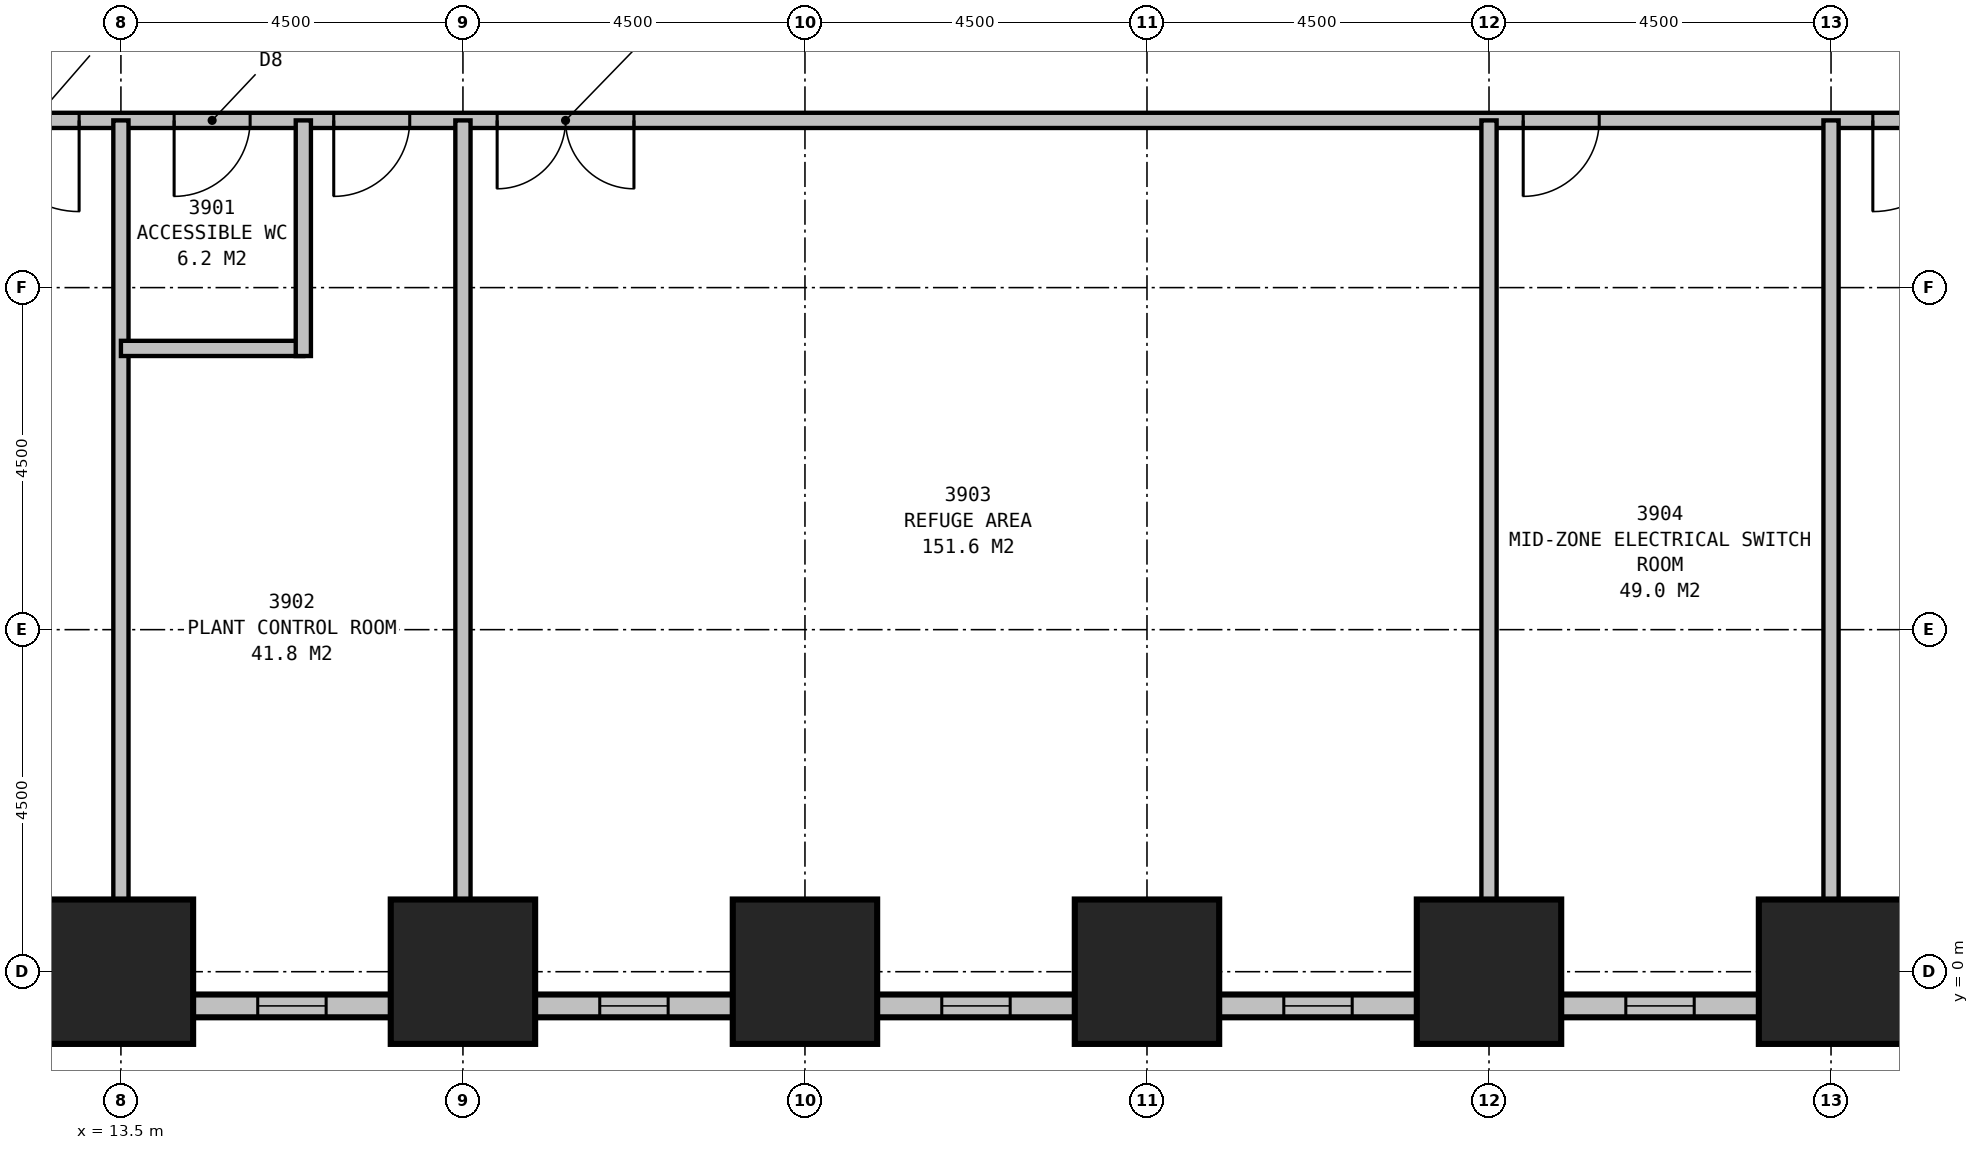
"""IFC4 building model, lengths in metres.
Left out: names, types, materials, properties, quantities, classifications, styles, units other than length and angle.
Written with IfcOpenShell. Run it as: python <this file> out.ifc"""

import sys

from ifc_helpers import new_model, si_unit, direction, frame, frame_2d, origin, origin_2d, place, context, subcontext, project, spatial, rectangle, extrude, element, fill, save


model = new_model("IFC4")
c1 = context("Model", 3, precision=1e-05, world=origin(), true_north=direction((0.0, 1.0)))
c2 = subcontext(c1, "Body", "Model", "MODEL_VIEW")
j1 = project(units=[si_unit("LENGTHUNIT", "METRE"), si_unit("PLANEANGLEUNIT", "RADIAN")], contexts=[c1])
p1 = place(None, origin())
s1 = spatial("IfcSite", under=j1, at=p1, CompositionType="ELEMENT")
p2 = place(p1, origin())
s2 = spatial("IfcBuilding", under=s1, at=p2, CompositionType="ELEMENT")
p3 = place(p2, frame((0.0, 0.0, 151.9)))
s3 = spatial("IfcBuildingStorey", under=s2, at=p3, CompositionType="ELEMENT", Elevation=151.9)
for number, where, z_axis, x_axis in (
    (1, (13.5, 0.0, 0.0), (0.0, 0.0, 1.0), (1.0, 0.0, 0.0)),
    (2, (18.0, 0.0, 0.0), (0.0, 0.0, 1.0), (1.0, 0.0, 0.0)),
    (3, (22.5, 0.0, 0.0), (0.0, 0.0, 1.0), (1.0, 0.0, 0.0)),
    (4, (27.0, 0.0, 0.0), (0.0, 0.0, 1.0), (1.0, 0.0, 0.0)),
    (5, (31.5, 0.0, 0.0), (0.0, 0.0, 1.0), (1.0, 0.0, 0.0)),
    (6, (36.0, 0.0, 0.0), (0.0, 0.0, 1.0), (1.0, 0.0, 0.0)),
):
    element("IfcColumn", number, at=place(p3, frame(where, z_axis=z_axis, x_axis=x_axis)), inside=s3, PredefinedType="COLUMN", context=c2, shape_type="SweptSolid", body=[
        extrude(rectangle(XDim=1.9, YDim=1.9, at=origin_2d()), origin(), (0.0, 0.0, 1.0), 6.0),
    ])
p4 = place(p3, frame((3.9, -0.45, 0.0), z_axis=(0.0, 0.0, 1.0), x_axis=(1.0, 0.0, 0.0)))
e7 = element("IfcWall", 7, at=p4, inside=s3, PredefinedType="STANDARD", context=c2, shape_type="SweptSolid", body=[
    extrude(rectangle(XDim=41.7, YDim=0.3, at=frame_2d((20.85, 0.0))), origin(), (0.0, 0.0, 1.0), 3.35),
])
p5 = place(p4, frame((2.4, 0.0, 0.5)))
e8 = element("IfcOpeningElement", 8, at=p5, cuts=e7, PredefinedType="OPENING", context=c2, shape_type="SweptSolid", body=[
    extrude(rectangle(XDim=0.9, YDim=1.2, at=frame_2d((0.45, 0.6))), frame((0.0, 0.16, 0.0), z_axis=(0.0, -1.0, 0.0), x_axis=(1.0, 0.0, 0.0)), (0.0, 0.0, 1.0), 0.32),
])
p6 = place(p4, frame((6.9, 0.0, 0.5)))
e9 = element("IfcOpeningElement", 9, at=p6, cuts=e7, PredefinedType="OPENING", context=c2, shape_type="SweptSolid", body=[
    extrude(rectangle(XDim=0.9, YDim=1.2, at=frame_2d((0.45, 0.6))), frame((0.0, 0.16, 0.0), z_axis=(0.0, -1.0, 0.0), x_axis=(1.0, 0.0, 0.0)), (0.0, 0.0, 1.0), 0.32),
])
p7 = place(p4, frame((11.4, 0.0, 0.5)))
e10 = element("IfcOpeningElement", 10, at=p7, cuts=e7, PredefinedType="OPENING", context=c2, shape_type="SweptSolid", body=[
    extrude(rectangle(XDim=0.9, YDim=1.2, at=frame_2d((0.45, 0.6))), frame((0.0, 0.16, 0.0), z_axis=(0.0, -1.0, 0.0), x_axis=(1.0, 0.0, 0.0)), (0.0, 0.0, 1.0), 0.32),
])
p8 = place(p4, frame((15.9, 0.0, 0.5)))
e11 = element("IfcOpeningElement", 11, at=p8, cuts=e7, PredefinedType="OPENING", context=c2, shape_type="SweptSolid", body=[
    extrude(rectangle(XDim=0.9, YDim=1.2, at=frame_2d((0.45, 0.6))), frame((0.0, 0.16, 0.0), z_axis=(0.0, -1.0, 0.0), x_axis=(1.0, 0.0, 0.0)), (0.0, 0.0, 1.0), 0.32),
])
p9 = place(p4, frame((20.4, 0.0, 0.5)))
e12 = element("IfcOpeningElement", 12, at=p9, cuts=e7, PredefinedType="OPENING", context=c2, shape_type="SweptSolid", body=[
    extrude(rectangle(XDim=0.9, YDim=1.2, at=frame_2d((0.45, 0.6))), frame((0.0, 0.16, 0.0), z_axis=(0.0, -1.0, 0.0), x_axis=(1.0, 0.0, 0.0)), (0.0, 0.0, 1.0), 0.32),
])
p10 = place(p4, frame((24.9, 0.0, 0.5)))
e13 = element("IfcOpeningElement", 13, at=p10, cuts=e7, PredefinedType="OPENING", context=c2, shape_type="SweptSolid", body=[
    extrude(rectangle(XDim=0.9, YDim=1.2, at=frame_2d((0.45, 0.6))), frame((0.0, 0.16, 0.0), z_axis=(0.0, -1.0, 0.0), x_axis=(1.0, 0.0, 0.0)), (0.0, 0.0, 1.0), 0.32),
])
p11 = place(p4, frame((29.4, 0.0, 0.5)))
e14 = element("IfcOpeningElement", 14, at=p11, cuts=e7, PredefinedType="OPENING", context=c2, shape_type="SweptSolid", body=[
    extrude(rectangle(XDim=0.9, YDim=1.2, at=frame_2d((0.45, 0.6))), frame((0.0, 0.16, 0.0), z_axis=(0.0, -1.0, 0.0), x_axis=(1.0, 0.0, 0.0)), (0.0, 0.0, 1.0), 0.32),
])
p12 = place(p4, frame((33.9, 0.0, 0.5)))
e15 = element("IfcOpeningElement", 15, at=p12, cuts=e7, PredefinedType="OPENING", context=c2, shape_type="SweptSolid", body=[
    extrude(rectangle(XDim=0.9, YDim=1.2, at=frame_2d((0.45, 0.6))), frame((0.0, 0.16, 0.0), z_axis=(0.0, -1.0, 0.0), x_axis=(1.0, 0.0, 0.0)), (0.0, 0.0, 1.0), 0.32),
])
p13 = place(p4, frame((38.4, 0.0, 0.5)))
e16 = element("IfcOpeningElement", 16, at=p13, cuts=e7, PredefinedType="OPENING", context=c2, shape_type="SweptSolid", body=[
    extrude(rectangle(XDim=0.9, YDim=1.2, at=frame_2d((0.45, 0.6))), frame((0.0, 0.16, 0.0), z_axis=(0.0, -1.0, 0.0), x_axis=(1.0, 0.0, 0.0)), (0.0, 0.0, 1.0), 0.32),
])
p14 = place(p3, frame((11.2, 11.2, 0.0), z_axis=(0.0, 0.0, 1.0), x_axis=(1.0, 0.0, 0.0)))
e17 = element("IfcWall", 17, at=p14, inside=s3, PredefinedType="PARTITIONING", context=c2, shape_type="SweptSolid", body=[
    extrude(rectangle(XDim=27.1, YDim=0.2, at=frame_2d((13.55, 0.0))), origin(), (0.0, 0.0, 1.0), 5.75),
])
p15 = place(p14, frame((4.0, 0.0, 0.0), z_axis=(0.0, 0.0, 1.0), x_axis=(-1.0, 0.0, 0.0)))
e18 = element("IfcOpeningElement", 18, at=p15, cuts=e17, PredefinedType="OPENING", context=c2, shape_type="SweptSolid", body=[
    extrude(rectangle(XDim=1.0, YDim=2.1, at=frame_2d((0.5, 1.05))), frame((0.0, 0.11, 0.0), z_axis=(0.0, -1.0, 0.0), x_axis=(1.0, 0.0, 0.0)), (0.0, 0.0, 1.0), 0.22),
])
p16 = place(p14, frame((6.1, 0.0, 0.0), z_axis=(0.0, 0.0, 1.0), x_axis=(-1.0, 0.0, 0.0)))
e19 = element("IfcOpeningElement", 19, at=p16, cuts=e17, PredefinedType="OPENING", context=c2, shape_type="SweptSolid", body=[
    extrude(rectangle(XDim=1.0, YDim=2.1, at=frame_2d((0.5, 1.05))), frame((0.0, 0.11, 0.0), z_axis=(0.0, -1.0, 0.0), x_axis=(1.0, 0.0, 0.0)), (0.0, 0.0, 1.0), 0.22),
])
p17 = place(p14, frame((9.05, 0.0, 0.0), z_axis=(0.0, 0.0, 1.0), x_axis=(-1.0, 0.0, 0.0)))
e20 = element("IfcOpeningElement", 20, at=p17, cuts=e17, PredefinedType="OPENING", context=c2, shape_type="SweptSolid", body=[
    extrude(rectangle(XDim=1.8, YDim=2.4, at=frame_2d((0.9, 1.2))), frame((0.0, 0.11, 0.0), z_axis=(0.0, -1.0, 0.0), x_axis=(1.0, 0.0, 0.0)), (0.0, 0.0, 1.0), 0.22),
])
p18 = place(p14, frame((21.75, 0.0, 0.0), z_axis=(0.0, 0.0, 1.0), x_axis=(-1.0, 0.0, 0.0)))
e21 = element("IfcOpeningElement", 21, at=p18, cuts=e17, PredefinedType="OPENING", context=c2, shape_type="SweptSolid", body=[
    extrude(rectangle(XDim=1.0, YDim=2.1, at=frame_2d((0.5, 1.05))), frame((0.0, 0.11, 0.0), z_axis=(0.0, -1.0, 0.0), x_axis=(1.0, 0.0, 0.0)), (0.0, 0.0, 1.0), 0.22),
])
p19 = place(p14, frame((1.75, 0.0, 0.0), z_axis=(0.0, 0.0, 1.0), x_axis=(-1.0, 0.0, 0.0)))
e22 = element("IfcOpeningElement", 22, at=p19, cuts=e17, PredefinedType="OPENING", context=c2, shape_type="SweptSolid", body=[
    extrude(rectangle(XDim=1.2, YDim=2.1, at=frame_2d((0.6, 1.05))), frame((0.0, 0.11, 0.0), z_axis=(0.0, -1.0, 0.0), x_axis=(1.0, 0.0, 0.0)), (0.0, 0.0, 1.0), 0.22),
])
p20 = place(p14, frame((26.55, 0.0, 0.0), z_axis=(0.0, 0.0, 1.0), x_axis=(-1.0, 0.0, 0.0)))
e23 = element("IfcOpeningElement", 23, at=p20, cuts=e17, PredefinedType="OPENING", context=c2, shape_type="SweptSolid", body=[
    extrude(rectangle(XDim=1.2, YDim=2.1, at=frame_2d((0.6, 1.05))), frame((0.0, 0.11, 0.0), z_axis=(0.0, -1.0, 0.0), x_axis=(1.0, 0.0, 0.0)), (0.0, 0.0, 1.0), 0.22),
])
for number, where, z_axis, x_axis in (
    (24, (13.5, 11.2, 0.0), (0.0, 0.0, 1.0), (0.0, -1.0, 0.0)),
    (25, (18.0, 11.2, 0.0), (0.0, 0.0, 1.0), (0.0, -1.0, 0.0)),
    (26, (31.5, 11.2, 0.0), (0.0, 0.0, 1.0), (0.0, -1.0, 0.0)),
    (27, (36.0, 11.2, 0.0), (0.0, 0.0, 1.0), (0.0, -1.0, 0.0)),
):
    element("IfcWall", number, at=place(p3, frame(where, z_axis=z_axis, x_axis=x_axis)), inside=s3, PredefinedType="PARTITIONING", context=c2, shape_type="SweptSolid", body=[
        extrude(rectangle(XDim=10.25, YDim=0.2, at=frame_2d((5.125, 0.0))), origin(), (0.0, 0.0, 1.0), 4.75),
    ])
p21 = place(p3, frame((15.9, 11.2, 0.0), z_axis=(0.0, 0.0, 1.0), x_axis=(0.0, -1.0, 0.0)))
e28 = element("IfcWall", 28, at=p21, inside=s3, PredefinedType="PARTITIONING", context=c2, shape_type="SweptSolid", body=[
    extrude(rectangle(XDim=3.1, YDim=0.2, at=frame_2d((1.55, 0.0))), origin(), (0.0, 0.0, 1.0), 5.75),
])
p22 = place(p3, frame((13.5, 8.2, 0.0), z_axis=(0.0, 0.0, 1.0), x_axis=(1.0, 0.0, 0.0)))
e29 = element("IfcWall", 29, at=p22, inside=s3, PredefinedType="PARTITIONING", context=c2, shape_type="SweptSolid", body=[
    extrude(rectangle(XDim=2.4, YDim=0.2, at=frame_2d((1.2, 0.0))), origin(), (0.0, 0.0, 1.0), 5.75),
])
p23 = place(p7, origin())
e30 = element("IfcWindow", 30, at=p23, inside=s3, PartitioningType="SINGLE_PANEL", PredefinedType="USERDEFINED", context=c2, shape_type="SweptSolid", body=[
    extrude(rectangle(XDim=0.9, YDim=1.2, at=frame_2d((0.45, 0.6))), frame((0.0, 0.03, 0.0), z_axis=(0.0, -1.0, 0.0), x_axis=(1.0, 0.0, 0.0)), (0.0, 0.0, 1.0), 0.06),
])
fill(e10, e30)
p24 = place(p8, origin())
e31 = element("IfcWindow", 31, at=p24, inside=s3, PartitioningType="SINGLE_PANEL", PredefinedType="USERDEFINED", context=c2, shape_type="SweptSolid", body=[
    extrude(rectangle(XDim=0.9, YDim=1.2, at=frame_2d((0.45, 0.6))), frame((0.0, 0.03, 0.0), z_axis=(0.0, -1.0, 0.0), x_axis=(1.0, 0.0, 0.0)), (0.0, 0.0, 1.0), 0.06),
])
fill(e11, e31)
p25 = place(p9, origin())
e32 = element("IfcWindow", 32, at=p25, inside=s3, PartitioningType="SINGLE_PANEL", PredefinedType="USERDEFINED", context=c2, shape_type="SweptSolid", body=[
    extrude(rectangle(XDim=0.9, YDim=1.2, at=frame_2d((0.45, 0.6))), frame((0.0, 0.03, 0.0), z_axis=(0.0, -1.0, 0.0), x_axis=(1.0, 0.0, 0.0)), (0.0, 0.0, 1.0), 0.06),
])
fill(e12, e32)
p26 = place(p10, origin())
e33 = element("IfcWindow", 33, at=p26, inside=s3, PartitioningType="SINGLE_PANEL", PredefinedType="USERDEFINED", context=c2, shape_type="SweptSolid", body=[
    extrude(rectangle(XDim=0.9, YDim=1.2, at=frame_2d((0.45, 0.6))), frame((0.0, 0.03, 0.0), z_axis=(0.0, -1.0, 0.0), x_axis=(1.0, 0.0, 0.0)), (0.0, 0.0, 1.0), 0.06),
])
fill(e13, e33)
p27 = place(p11, origin())
e34 = element("IfcWindow", 34, at=p27, inside=s3, PartitioningType="SINGLE_PANEL", PredefinedType="USERDEFINED", context=c2, shape_type="SweptSolid", body=[
    extrude(rectangle(XDim=0.9, YDim=1.2, at=frame_2d((0.45, 0.6))), frame((0.0, 0.03, 0.0), z_axis=(0.0, -1.0, 0.0), x_axis=(1.0, 0.0, 0.0)), (0.0, 0.0, 1.0), 0.06),
])
fill(e14, e34)
p28 = place(p15, origin())
e35 = element("IfcDoor", 35, at=p28, inside=s3, OperationType="SINGLE_SWING_RIGHT", PredefinedType="DOOR", context=c2, shape_type="SweptSolid", body=[
    extrude(rectangle(XDim=1.0, YDim=2.1, at=frame_2d((0.5, 1.05))), frame((0.0, 0.025, 0.0), z_axis=(0.0, -1.0, 0.0), x_axis=(1.0, 0.0, 0.0)), (0.0, 0.0, 1.0), 0.05),
])
fill(e18, e35)
p29 = place(p16, origin())
e36 = element("IfcDoor", 36, at=p29, inside=s3, OperationType="SINGLE_SWING_RIGHT", PredefinedType="DOOR", context=c2, shape_type="SweptSolid", body=[
    extrude(rectangle(XDim=1.0, YDim=2.1, at=frame_2d((0.5, 1.05))), frame((0.0, 0.025, 0.0), z_axis=(0.0, -1.0, 0.0), x_axis=(1.0, 0.0, 0.0)), (0.0, 0.0, 1.0), 0.05),
])
fill(e19, e36)
p30 = place(p17, origin())
e37 = element("IfcDoor", 37, at=p30, inside=s3, OperationType="DOUBLE_DOOR_SINGLE_SWING", PredefinedType="DOOR", context=c2, shape_type="SweptSolid", body=[
    extrude(rectangle(XDim=1.8, YDim=2.4, at=frame_2d((0.9, 1.2))), frame((0.0, 0.025, 0.0), z_axis=(0.0, -1.0, 0.0), x_axis=(1.0, 0.0, 0.0)), (0.0, 0.0, 1.0), 0.05),
])
fill(e20, e37)
p31 = place(p18, origin())
e38 = element("IfcDoor", 38, at=p31, inside=s3, OperationType="SINGLE_SWING_RIGHT", PredefinedType="DOOR", context=c2, shape_type="SweptSolid", body=[
    extrude(rectangle(XDim=1.0, YDim=2.1, at=frame_2d((0.5, 1.05))), frame((0.0, 0.025, 0.0), z_axis=(0.0, -1.0, 0.0), x_axis=(1.0, 0.0, 0.0)), (0.0, 0.0, 1.0), 0.05),
])
fill(e21, e38)
p32 = place(p19, origin())
e39 = element("IfcDoor", 39, at=p32, inside=s3, OperationType="SINGLE_SWING_LEFT", PredefinedType="DOOR", context=c2, shape_type="SweptSolid", body=[
    extrude(rectangle(XDim=1.2, YDim=2.1, at=frame_2d((0.6, 1.05))), frame((0.0, 0.025, 0.0), z_axis=(0.0, -1.0, 0.0), x_axis=(1.0, 0.0, 0.0)), (0.0, 0.0, 1.0), 0.05),
])
fill(e22, e39)
p33 = place(p20, origin())
e40 = element("IfcDoor", 40, at=p33, inside=s3, OperationType="SINGLE_SWING_RIGHT", PredefinedType="DOOR", context=c2, shape_type="SweptSolid", body=[
    extrude(rectangle(XDim=1.2, YDim=2.1, at=frame_2d((0.6, 1.05))), frame((0.0, 0.025, 0.0), z_axis=(0.0, -1.0, 0.0), x_axis=(1.0, 0.0, 0.0)), (0.0, 0.0, 1.0), 0.05),
])
fill(e23, e40)
save(model, sys.argv[1])
